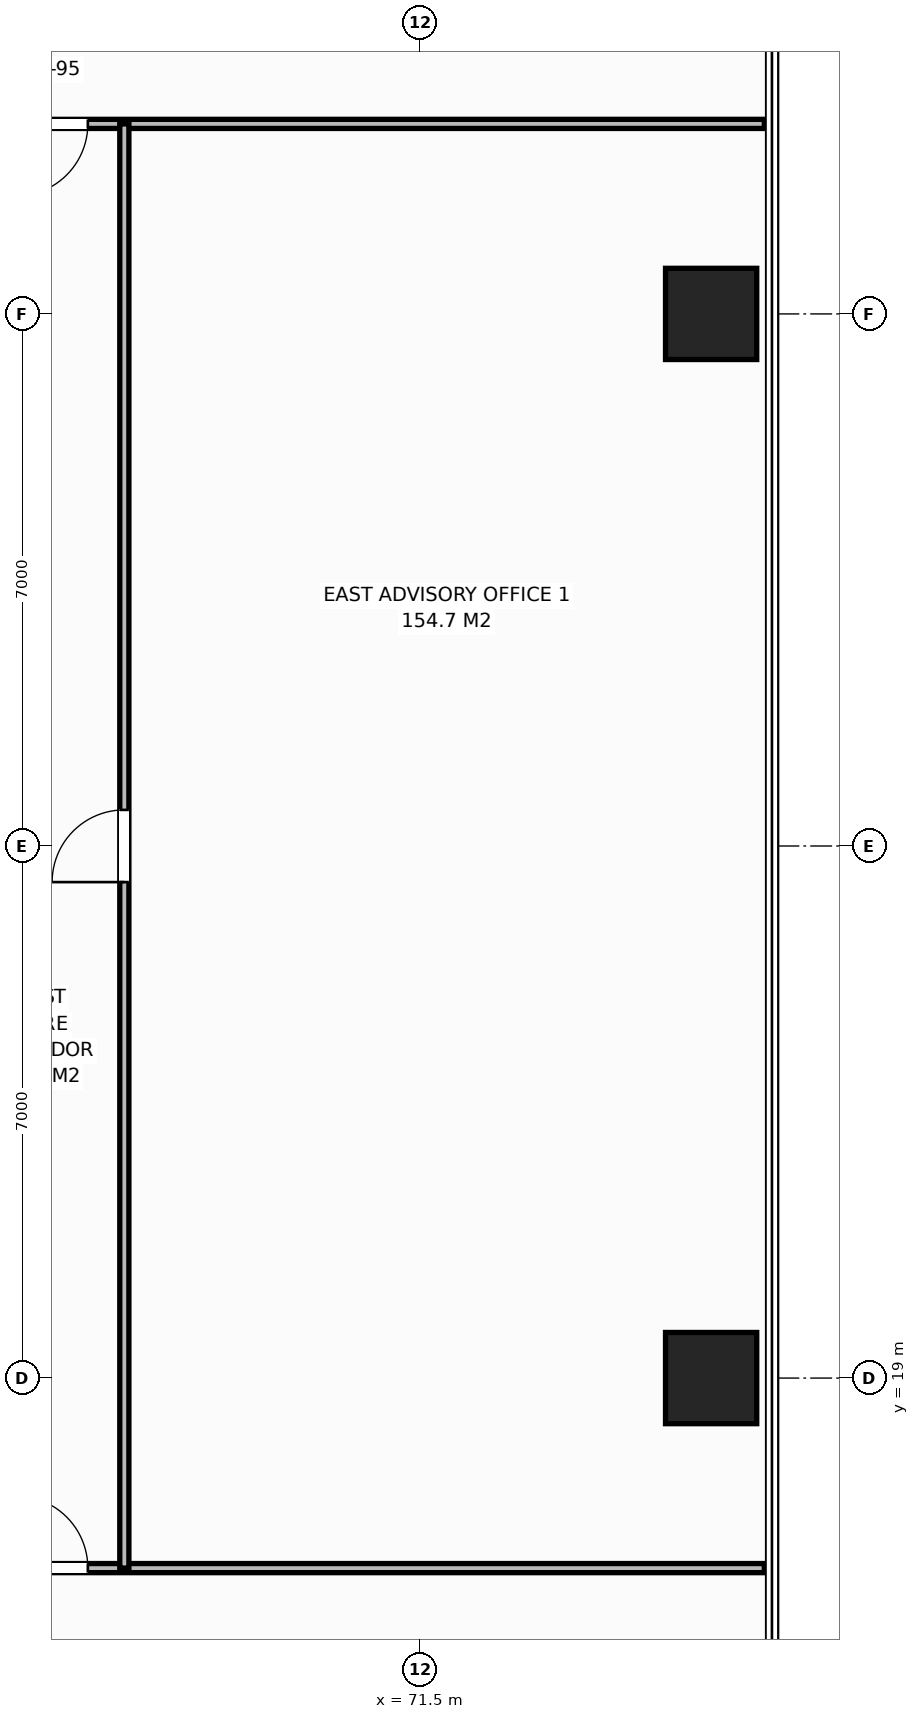
"""IFC4 building model, lengths in metres.
Left out: names, types, materials, properties, quantities, classifications, styles, units other than length and angle.
Written with IfcOpenShell. Run it as: python <this file> out.ifc"""

import sys

from ifc_helpers import new_model, si_unit, direction, frame, frame_2d, origin, origin_2d, place, context, subcontext, project, spatial, rectangle, extrude, element, fill, save


model = new_model("IFC4")
c1 = context("Model", 3, precision=1e-05, world=origin(), true_north=direction((0.0, 1.0)))
c2 = subcontext(c1, "Body", "Model", "MODEL_VIEW")
j1 = project(units=[si_unit("LENGTHUNIT", "METRE"), si_unit("PLANEANGLEUNIT", "RADIAN")], contexts=[c1])
p1 = place(None, origin())
s1 = spatial("IfcSite", under=j1, at=p1, CompositionType="ELEMENT")
p2 = place(p1, origin())
s2 = spatial("IfcBuilding", under=s1, at=p2, CompositionType="ELEMENT")
p3 = place(p2, frame((0.0, 0.0, 86.0)))
s3 = spatial("IfcBuildingStorey", under=s2, at=p3, CompositionType="ELEMENT", Elevation=86.0)
for number, where, z_axis, x_axis in (
    (1, (75.32, 19.0, 0.0), (0.0, 0.0, 1.0), (1.0, 0.0, 0.0)),
    (2, (75.32, 33.0, 0.0), (0.0, 0.0, 1.0), (1.0, 0.0, 0.0)),
):
    element("IfcColumn", number, at=place(p3, frame(where, z_axis=z_axis, x_axis=x_axis)), inside=s3, PredefinedType="COLUMN", context=c2, shape_type="SweptSolid", body=[
        extrude(rectangle(XDim=1.2, YDim=1.2, at=origin_2d()), origin(), (0.0, 0.0, 1.0), 3.8),
    ])
p4 = place(p3, frame((64.86, 35.5, 0.0), z_axis=(0.0, 0.0, 1.0), x_axis=(1.0, 0.0, 0.0)))
e3 = element("IfcWall", 3, at=p4, inside=s3, PredefinedType="PARTITIONING", context=c2, shape_type="SweptSolid", body=[
    extrude(rectangle(XDim=11.16, YDim=0.12, at=frame_2d((5.58, 0.0))), origin(), (0.0, 0.0, 1.0), 3.565),
])
p5 = place(p4, frame((1.31, 0.0, 0.0)))
e4 = element("IfcOpeningElement", 4, at=p5, cuts=e3, PredefinedType="OPENING", context=c2, shape_type="SweptSolid", body=[
    extrude(rectangle(XDim=0.95, YDim=2.15, at=frame_2d((0.475, 1.075))), frame((0.0, 0.07, 0.0), z_axis=(0.0, -1.0, 0.0), x_axis=(1.0, 0.0, 0.0)), (0.0, 0.0, 1.0), 0.14),
])
p6 = place(p3, frame((51.817, 16.5, 0.0), z_axis=(0.0, 0.0, 1.0), x_axis=(1.0, 0.0, 0.0)))
e5 = element("IfcWall", 5, at=p6, inside=s3, PredefinedType="PARTITIONING", context=c2, shape_type="SweptSolid", body=[
    extrude(rectangle(XDim=24.203, YDim=0.12, at=frame_2d((12.102, 0.0))), origin(), (0.0, 0.0, 1.0), 3.565),
])
p7 = place(p6, frame((14.353, 0.0, 0.0)))
e6 = element("IfcOpeningElement", 6, at=p7, cuts=e5, PredefinedType="OPENING", context=c2, shape_type="SweptSolid", body=[
    extrude(rectangle(XDim=0.95, YDim=2.15, at=frame_2d((0.475, 1.075))), frame((0.0, 0.07, 0.0), z_axis=(0.0, -1.0, 0.0), x_axis=(1.0, 0.0, 0.0)), (0.0, 0.0, 1.0), 0.14),
])
p8 = place(p3, frame((67.6, 16.5, 0.0), z_axis=(0.0, 0.0, 1.0), x_axis=(0.0, 1.0, 0.0)))
e7 = element("IfcWall", 7, at=p8, inside=s3, PredefinedType="PARTITIONING", context=c2, shape_type="SweptSolid", body=[
    extrude(rectangle(XDim=19.0, YDim=0.12, at=frame_2d((9.5, 0.0))), origin(), (0.0, 0.0, 1.0), 3.565),
])
p9 = place(p8, frame((9.025, 0.0, 0.0)))
e8 = element("IfcOpeningElement", 8, at=p9, cuts=e7, PredefinedType="OPENING", context=c2, shape_type="SweptSolid", body=[
    extrude(rectangle(XDim=0.95, YDim=2.15, at=frame_2d((0.475, 1.075))), frame((0.0, 0.07, 0.0), z_axis=(0.0, -1.0, 0.0), x_axis=(1.0, 0.0, 0.0)), (0.0, 0.0, 1.0), 0.14),
])
p10 = place(p5, origin())
e9 = element("IfcDoor", 9, at=p10, inside=s3, OperationType="SINGLE_SWING_RIGHT", PredefinedType="DOOR", context=c2, shape_type="SweptSolid", body=[
    extrude(rectangle(XDim=0.95, YDim=2.15, at=frame_2d((0.475, 1.075))), frame((0.0, 0.025, 0.0), z_axis=(0.0, -1.0, 0.0), x_axis=(1.0, 0.0, 0.0)), (0.0, 0.0, 1.0), 0.05),
])
fill(e4, e9)
p11 = place(p7, origin())
e10 = element("IfcDoor", 10, at=p11, inside=s3, OperationType="SINGLE_SWING_LEFT", PredefinedType="DOOR", context=c2, shape_type="SweptSolid", body=[
    extrude(rectangle(XDim=0.95, YDim=2.15, at=frame_2d((0.475, 1.075))), frame((0.0, 0.025, 0.0), z_axis=(0.0, -1.0, 0.0), x_axis=(1.0, 0.0, 0.0)), (0.0, 0.0, 1.0), 0.05),
])
fill(e6, e10)
p12 = place(p9, origin())
e11 = element("IfcDoor", 11, at=p12, inside=s3, OperationType="SINGLE_SWING_LEFT", PredefinedType="DOOR", context=c2, shape_type="SweptSolid", body=[
    extrude(rectangle(XDim=0.95, YDim=2.15, at=frame_2d((0.475, 1.075))), frame((0.0, 0.025, 0.0), z_axis=(0.0, -1.0, 0.0), x_axis=(1.0, 0.0, 0.0)), (0.0, 0.0, 1.0), 0.05),
])
fill(e8, e11)
save(model, sys.argv[1])
